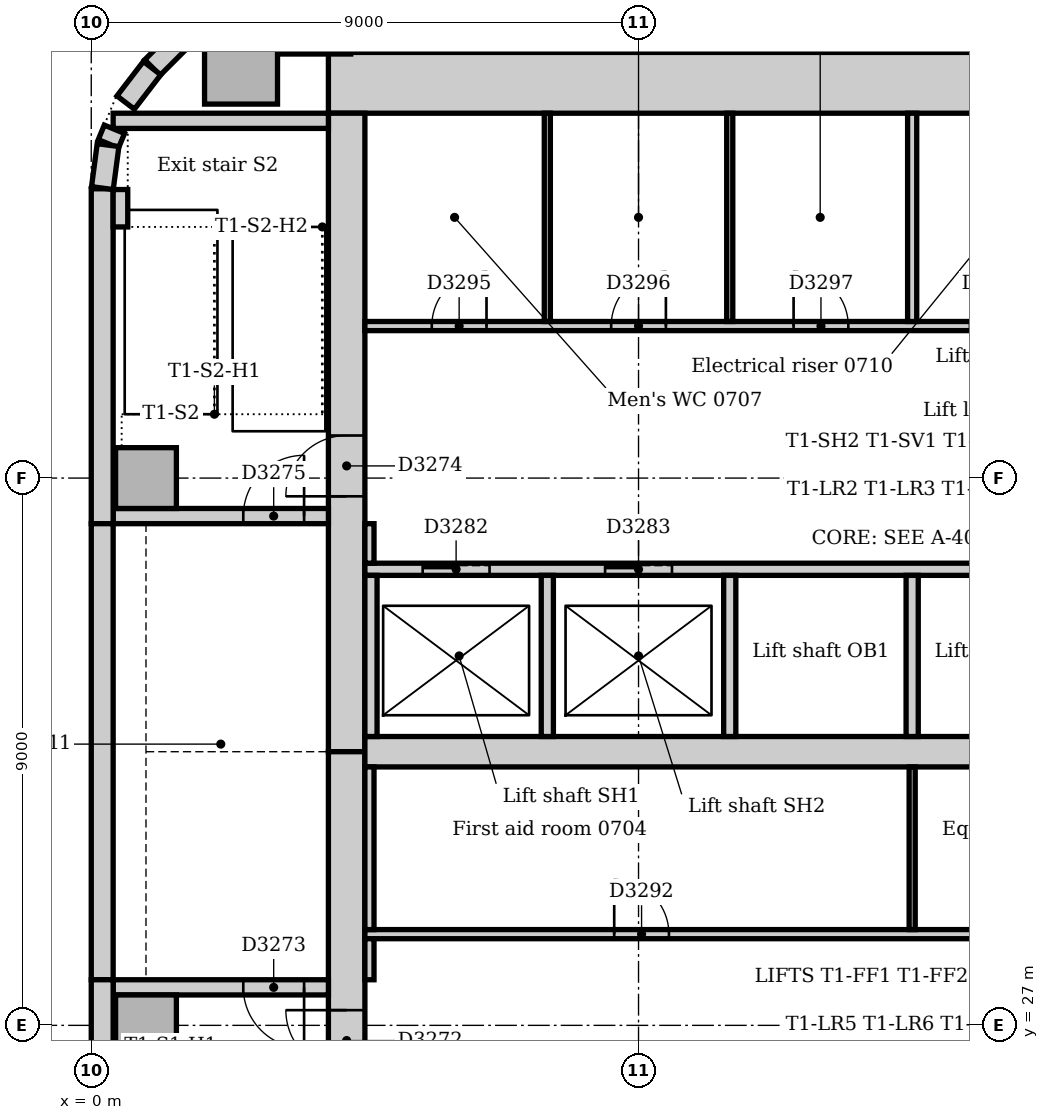
"""IFC4 building model, lengths in metres.
Left out: names, types, materials, properties, quantities, classifications, styles, units other than length and angle.
Written with IfcOpenShell. Run it as: python <this file> out.ifc"""

import sys

from ifc_helpers import new_model, si_unit, direction, frame, frame_2d, origin, origin_2d, place, context, subcontext, project, spatial, rectangle, extrude, element, fill, save


model = new_model("IFC4")
c1 = context("Model", 3, precision=1e-05, world=origin(), true_north=direction((0.0, 1.0)))
c2 = subcontext(c1, "Body", "Model", "MODEL_VIEW")
j1 = project(units=[si_unit("LENGTHUNIT", "METRE"), si_unit("PLANEANGLEUNIT", "RADIAN")], contexts=[c1])
p1 = place(None, origin())
s1 = spatial("IfcSite", under=j1, at=p1, CompositionType="ELEMENT")
p2 = place(p1, origin())
s2 = spatial("IfcBuilding", under=s1, at=p2, CompositionType="ELEMENT")
p3 = place(p2, frame((0.0, 0.0, 34.0)))
s3 = spatial("IfcBuildingStorey", under=s2, at=p3, CompositionType="ELEMENT", Elevation=34.0)
p4 = place(p3, frame((23.5, 42.5, 0.0), z_axis=(0.0, 0.0, 1.0), x_axis=(-1.0, 0.0, 0.0)))
e1 = element("IfcWall", 1, at=p4, inside=s3, PredefinedType="SOLIDWALL", context=c2, shape_type="SweptSolid", body=[
    extrude(rectangle(XDim=19.6, YDim=1.0, at=frame_2d((9.8, 0.0))), origin(), (0.0, 0.0, 1.0), 4.0),
])
p5 = place(p3, frame((4.2, 42.0, 0.0), z_axis=(0.0, 0.0, 1.0), x_axis=(0.0, -1.0, 0.0)))
e2 = element("IfcWall", 2, at=p5, inside=s3, PredefinedType="SOLIDWALL", context=c2, shape_type="SweptSolid", body=[
    extrude(rectangle(XDim=10.5, YDim=0.6, at=frame_2d((5.25, 0.0))), origin(), (0.0, 0.0, 1.0), 4.0),
])
p6 = place(p5, frame((5.3, 0.0, 0.0)))
e3 = element("IfcOpeningElement", 3, at=p6, cuts=e2, PredefinedType="OPENING", context=c2, shape_type="SweptSolid", body=[
    extrude(rectangle(XDim=1.0, YDim=2.1, at=frame_2d((0.5, 1.05))), frame((0.0, 0.31, 0.0), z_axis=(0.0, -1.0, 0.0), x_axis=(1.0, 0.0, 0.0)), (0.0, 0.0, 1.0), 0.62),
])
p7 = place(p3, frame((4.2, 31.5, 0.0), z_axis=(0.0, 0.0, 1.0), x_axis=(0.0, -1.0, 0.0)))
e4 = element("IfcWall", 4, at=p7, inside=s3, PredefinedType="SOLIDWALL", context=c2, shape_type="SweptSolid", body=[
    extrude(rectangle(XDim=10.5, YDim=0.6, at=frame_2d((5.25, 0.0))), origin(), (0.0, 0.0, 1.0), 4.0),
])
p8 = place(p7, frame((4.25, 0.0, 0.0)))
e5 = element("IfcOpeningElement", 5, at=p8, cuts=e4, PredefinedType="OPENING", context=c2, shape_type="SweptSolid", body=[
    extrude(rectangle(XDim=1.0, YDim=2.1, at=frame_2d((0.5, 1.05))), frame((0.0, 0.31, 0.0), z_axis=(0.0, -1.0, 0.0), x_axis=(1.0, 0.0, 0.0)), (0.0, 0.0, 1.0), 0.62),
])
p9 = place(p3, frame((4.5, 31.5, 0.0), z_axis=(0.0, 0.0, 1.0), x_axis=(1.0, 0.0, 0.0)))
e6 = element("IfcWall", 6, at=p9, inside=s3, PredefinedType="SOLIDWALL", context=c2, shape_type="SweptSolid", body=[
    extrude(rectangle(XDim=18.0, YDim=0.5, at=frame_2d((9.0, 0.0))), origin(), (0.0, 0.0, 1.0), 4.0),
])
p10 = place(p3, frame((3.9, 27.625, 0.0), z_axis=(0.0, 0.0, 1.0), x_axis=(-1.0, 0.0, 0.0)))
e7 = element("IfcWall", 7, at=p10, inside=s3, PredefinedType="SOLIDWALL", context=c2, shape_type="SweptSolid", body=[
    extrude(rectangle(XDim=3.54, YDim=0.25, at=frame_2d((1.77, 0.0))), origin(), (0.0, 0.0, 1.0), 4.0),
])
p11 = place(p10, frame((0.4, 0.0, 0.0)))
e8 = element("IfcOpeningElement", 8, at=p11, cuts=e7, PredefinedType="OPENING", context=c2, shape_type="SweptSolid", body=[
    extrude(rectangle(XDim=1.0, YDim=2.1, at=frame_2d((0.5, 1.05))), frame((0.0, 0.135, 0.0), z_axis=(0.0, -1.0, 0.0), x_axis=(1.0, 0.0, 0.0)), (0.0, 0.0, 1.0), 0.27),
])
p12 = place(p3, frame((0.36, 35.375, 0.0), z_axis=(0.0, 0.0, 1.0), x_axis=(1.0, 0.0, 0.0)))
e9 = element("IfcWall", 9, at=p12, inside=s3, PredefinedType="SOLIDWALL", context=c2, shape_type="SweptSolid", body=[
    extrude(rectangle(XDim=3.54, YDim=0.25, at=frame_2d((1.77, 0.0))), origin(), (0.0, 0.0, 1.0), 4.0),
])
p13 = place(p12, frame((2.14, 0.0, 0.0)))
e10 = element("IfcOpeningElement", 10, at=p13, cuts=e9, PredefinedType="OPENING", context=c2, shape_type="SweptSolid", body=[
    extrude(rectangle(XDim=1.0, YDim=2.1, at=frame_2d((0.5, 1.05))), frame((0.0, 0.135, 0.0), z_axis=(0.0, -1.0, 0.0), x_axis=(1.0, 0.0, 0.0)), (0.0, 0.0, 1.0), 0.27),
])
p14 = place(p3, frame((3.9, 41.875, 0.0), z_axis=(0.0, 0.0, 1.0), x_axis=(-1.0, 0.0, 0.0)))
e11 = element("IfcWall", 11, at=p14, inside=s3, PredefinedType="SOLIDWALL", context=c2, shape_type="SweptSolid", body=[
    extrude(rectangle(XDim=3.54, YDim=0.25, at=frame_2d((1.77, 0.0))), origin(), (0.0, 0.0, 1.0), 4.0),
])
for number, where, z_axis, x_axis in (
    (12, (3.667, 43.574, 0.0), (0.0, 0.0, 1.0), (1.0, 0.0, 0.0)),
    (13, (2.463, 42.75, 0.0), (0.0, 0.0, 1.0), (1.0, 0.0, 0.0)),
):
    element("IfcColumn", number, at=place(p3, frame(where, z_axis=z_axis, x_axis=x_axis)), inside=s3, PredefinedType="COLUMN", context=c2, shape_type="SweptSolid", body=[
        extrude(rectangle(XDim=1.2, YDim=1.2, at=origin_2d()), origin(), (0.0, 0.0, 1.0), 3.85),
    ])
for number, where, z_axis, x_axis in (
    (14, (0.9, 27.0, 0.0), (0.0, 0.0, 1.0), (1.0, 0.0, 0.0)),
    (15, (0.9, 36.0, 0.0), (0.0, 0.0, 1.0), (1.0, 0.0, 0.0)),
):
    element("IfcColumn", number, at=place(p3, frame(where, z_axis=z_axis, x_axis=x_axis)), inside=s3, PredefinedType="COLUMN", context=c2, shape_type="SweptSolid", body=[
        extrude(rectangle(XDim=1.0, YDim=1.0, at=origin_2d()), origin(), (0.0, 0.0, 1.0), 4.0),
    ])
p15 = place(p3, frame((2.249, 43.994, 0.0), z_axis=(0.0, 0.0, 1.0), x_axis=(-0.707106781187, -0.707106781187, 0.0)))
e16 = element("IfcWall", 16, at=p15, inside=s3, PredefinedType="STANDARD", context=c2, shape_type="SweptSolid", body=[
    extrude(rectangle(XDim=1.757, YDim=0.36, at=frame_2d((0.879, 0.0))), origin(), (0.0, 0.0, 1.0), 3.85),
])
p16 = place(p3, frame((0.18, 40.757, 0.0), z_axis=(0.0, 0.0, 1.0), x_axis=(0.0, -1.0, 0.0)))
e17 = element("IfcWall", 17, at=p16, inside=s3, PredefinedType="STANDARD", context=c2, shape_type="SweptSolid", body=[
    extrude(rectangle(XDim=5.507, YDim=0.36, at=frame_2d((2.754, 0.0))), origin(), (0.0, 0.0, 1.0), 3.85),
])
p17 = place(p3, frame((0.18, 35.25, 0.0), z_axis=(0.0, 0.0, 1.0), x_axis=(0.0, -1.0, 0.0)))
e18 = element("IfcWall", 18, at=p17, inside=s3, PredefinedType="STANDARD", context=c2, shape_type="SweptSolid", body=[
    extrude(rectangle(XDim=7.5, YDim=0.36, at=frame_2d((3.75, 0.0))), origin(), (0.0, 0.0, 1.0), 3.85),
])
p18 = place(p3, frame((0.18, 27.75, 0.0), z_axis=(0.0, 0.0, 1.0), x_axis=(0.0, -1.0, 0.0)))
e19 = element("IfcWall", 19, at=p18, inside=s3, PredefinedType="STANDARD", context=c2, shape_type="SweptSolid", body=[
    extrude(rectangle(XDim=6.75, YDim=0.36, at=frame_2d((3.375, 0.0))), origin(), (0.0, 0.0, 1.0), 3.85),
])
p19 = place(p3, frame((1.0, 42.741, 0.0), z_axis=(0.0, 0.0, 1.0), x_axis=(-0.608802368033, -0.793321924995, 0.0)))
e20 = element("IfcWall", 20, at=p19, inside=s3, PredefinedType="STANDARD", context=c2, shape_type="SweptSolid", body=[
    extrude(rectangle(XDim=0.713, YDim=0.36, at=frame_2d((0.357, 0.0))), origin(), (0.0, 0.0, 1.0), 3.85),
])
p20 = place(p3, frame((0.381, 41.736, 0.0), z_axis=(0.0, 0.0, 1.0), x_axis=(-0.382773360986, -0.923842277729, 0.0)))
e21 = element("IfcWall", 21, at=p20, inside=s3, PredefinedType="STANDARD", context=c2, shape_type="SweptSolid", body=[
    extrude(rectangle(XDim=0.258, YDim=0.36, at=frame_2d((0.129, 0.0))), origin(), (0.0, 0.0, 1.0), 3.85),
])
p21 = place(p3, frame((0.276, 41.476, 0.0), z_axis=(0.0, 0.0, 1.0), x_axis=(-0.13055608231, -0.99144092581, 0.0)))
e22 = element("IfcWall", 22, at=p21, inside=s3, PredefinedType="STANDARD", context=c2, shape_type="SweptSolid", body=[
    extrude(rectangle(XDim=0.713, YDim=0.36, at=frame_2d((0.356, 0.0))), origin(), (0.0, 0.0, 1.0), 3.85),
])
p22 = place(p3, frame((0.48, 40.13, 0.0), z_axis=(0.0, 0.0, 1.0), x_axis=(0.0, 1.0, 0.0)))
e23 = element("IfcWall", 23, at=p22, inside=s3, PredefinedType="STANDARD", context=c2, shape_type="SweptSolid", body=[
    extrude(rectangle(XDim=0.615, YDim=0.24, at=frame_2d((0.307, 0.0))), origin(), (0.0, 0.0, 1.0), 4.0),
])
p23 = place(p3, frame((4.5, 34.5, 0.0), z_axis=(0.0, 0.0, 1.0), x_axis=(1.0, 0.0, 0.0)))
e24 = element("IfcWall", 24, at=p23, inside=s3, PredefinedType="PARTITIONING", context=c2, shape_type="SweptSolid", body=[
    extrude(rectangle(XDim=18.0, YDim=0.2, at=frame_2d((9.0, 0.0))), origin(), (0.0, 0.0, 1.0), 3.85),
])
p24 = place(p23, frame((0.95, 0.0, 0.0)))
e25 = element("IfcOpeningElement", 25, at=p24, cuts=e24, PredefinedType="OPENING", context=c2, shape_type="SweptSolid", body=[
    extrude(rectangle(XDim=1.1, YDim=2.1, at=frame_2d((0.55, 1.05))), frame((0.0, 0.11, 0.0), z_axis=(0.0, -1.0, 0.0), x_axis=(1.0, 0.0, 0.0)), (0.0, 0.0, 1.0), 0.22),
])
p25 = place(p23, frame((3.95, 0.0, 0.0)))
e26 = element("IfcOpeningElement", 26, at=p25, cuts=e24, PredefinedType="OPENING", context=c2, shape_type="SweptSolid", body=[
    extrude(rectangle(XDim=1.1, YDim=2.1, at=frame_2d((0.55, 1.05))), frame((0.0, 0.11, 0.0), z_axis=(0.0, -1.0, 0.0), x_axis=(1.0, 0.0, 0.0)), (0.0, 0.0, 1.0), 0.22),
])
p26 = place(p23, frame((12.95, 0.0, 0.0)))
e27 = element("IfcOpeningElement", 27, at=p26, cuts=e24, PredefinedType="OPENING", context=c2, shape_type="SweptSolid", body=[
    extrude(rectangle(XDim=1.1, YDim=2.1, at=frame_2d((0.55, 1.05))), frame((0.0, 0.11, 0.0), z_axis=(0.0, -1.0, 0.0), x_axis=(1.0, 0.0, 0.0)), (0.0, 0.0, 1.0), 0.22),
])
p27 = place(p23, frame((15.95, 0.0, 0.0)))
e28 = element("IfcOpeningElement", 28, at=p27, cuts=e24, PredefinedType="OPENING", context=c2, shape_type="SweptSolid", body=[
    extrude(rectangle(XDim=1.1, YDim=2.1, at=frame_2d((0.55, 1.05))), frame((0.0, 0.11, 0.0), z_axis=(0.0, -1.0, 0.0), x_axis=(1.0, 0.0, 0.0)), (0.0, 0.0, 1.0), 0.22),
])
for number, where, z_axis, x_axis in (
    (29, (4.6, 31.75, 0.0), (0.0, 0.0, 1.0), (0.0, 1.0, 0.0)),
    (30, (7.5, 31.75, 0.0), (0.0, 0.0, 1.0), (0.0, 1.0, 0.0)),
    (31, (10.5, 31.75, 0.0), (0.0, 0.0, 1.0), (0.0, 1.0, 0.0)),
    (32, (13.5, 31.75, 0.0), (0.0, 0.0, 1.0), (0.0, 1.0, 0.0)),
):
    element("IfcWall", number, at=place(p3, frame(where, z_axis=z_axis, x_axis=x_axis)), inside=s3, PredefinedType="PARTITIONING", context=c2, shape_type="SweptSolid", body=[
        extrude(rectangle(XDim=2.65, YDim=0.2, at=frame_2d((1.325, 0.0))), origin(), (0.0, 0.0, 1.0), 3.85),
    ])
p28 = place(p3, frame((4.5, 28.5, 0.0), z_axis=(0.0, 0.0, 1.0), x_axis=(1.0, 0.0, 0.0)))
e33 = element("IfcWall", 33, at=p28, inside=s3, PredefinedType="PARTITIONING", context=c2, shape_type="SweptSolid", body=[
    extrude(rectangle(XDim=18.0, YDim=0.15, at=frame_2d((9.0, 0.0))), origin(), (0.0, 0.0, 1.0), 3.85),
])
p29 = place(p28, frame((4.1, 0.0, 0.0)))
e34 = element("IfcOpeningElement", 34, at=p29, cuts=e33, PredefinedType="OPENING", context=c2, shape_type="SweptSolid", body=[
    extrude(rectangle(XDim=0.9, YDim=2.1, at=frame_2d((0.45, 1.05))), frame((0.0, 0.085, 0.0), z_axis=(0.0, -1.0, 0.0), x_axis=(1.0, 0.0, 0.0)), (0.0, 0.0, 1.0), 0.17),
])
p30 = place(p28, frame((10.8, 0.0, 0.0)))
e35 = element("IfcOpeningElement", 35, at=p30, cuts=e33, PredefinedType="OPENING", context=c2, shape_type="SweptSolid", body=[
    extrude(rectangle(XDim=0.9, YDim=2.1, at=frame_2d((0.45, 1.05))), frame((0.0, 0.085, 0.0), z_axis=(0.0, -1.0, 0.0), x_axis=(1.0, 0.0, 0.0)), (0.0, 0.0, 1.0), 0.17),
])
p31 = place(p28, frame((15.2, 0.0, 0.0)))
e36 = element("IfcOpeningElement", 36, at=p31, cuts=e33, PredefinedType="OPENING", context=c2, shape_type="SweptSolid", body=[
    extrude(rectangle(XDim=0.9, YDim=2.1, at=frame_2d((0.45, 1.05))), frame((0.0, 0.085, 0.0), z_axis=(0.0, -1.0, 0.0), x_axis=(1.0, 0.0, 0.0)), (0.0, 0.0, 1.0), 0.17),
])
p32 = place(p3, frame((4.5, 38.5, 0.0), z_axis=(0.0, 0.0, 1.0), x_axis=(1.0, 0.0, 0.0)))
e37 = element("IfcWall", 37, at=p32, inside=s3, PredefinedType="PARTITIONING", context=c2, shape_type="SweptSolid", body=[
    extrude(rectangle(XDim=11.9, YDim=0.15, at=frame_2d((5.95, 0.0))), origin(), (0.0, 0.0, 1.0), 3.85),
])
p33 = place(p32, frame((1.1, 0.0, 0.0)))
e38 = element("IfcOpeningElement", 38, at=p33, cuts=e37, PredefinedType="OPENING", context=c2, shape_type="SweptSolid", body=[
    extrude(rectangle(XDim=0.9, YDim=2.1, at=frame_2d((0.45, 1.05))), frame((0.0, 0.085, 0.0), z_axis=(0.0, -1.0, 0.0), x_axis=(1.0, 0.0, 0.0)), (0.0, 0.0, 1.0), 0.17),
])
p34 = place(p32, frame((4.05, 0.0, 0.0)))
e39 = element("IfcOpeningElement", 39, at=p34, cuts=e37, PredefinedType="OPENING", context=c2, shape_type="SweptSolid", body=[
    extrude(rectangle(XDim=0.9, YDim=2.1, at=frame_2d((0.45, 1.05))), frame((0.0, 0.085, 0.0), z_axis=(0.0, -1.0, 0.0), x_axis=(1.0, 0.0, 0.0)), (0.0, 0.0, 1.0), 0.17),
])
p35 = place(p32, frame((7.05, 0.0, 0.0)))
e40 = element("IfcOpeningElement", 40, at=p35, cuts=e37, PredefinedType="OPENING", context=c2, shape_type="SweptSolid", body=[
    extrude(rectangle(XDim=0.9, YDim=2.1, at=frame_2d((0.45, 1.05))), frame((0.0, 0.085, 0.0), z_axis=(0.0, -1.0, 0.0), x_axis=(1.0, 0.0, 0.0)), (0.0, 0.0, 1.0), 0.17),
])
p36 = place(p32, frame((9.95, 0.0, 0.0)))
e41 = element("IfcOpeningElement", 41, at=p36, cuts=e37, PredefinedType="OPENING", context=c2, shape_type="SweptSolid", body=[
    extrude(rectangle(XDim=0.8, YDim=2.1, at=frame_2d((0.4, 1.05))), frame((0.0, 0.085, 0.0), z_axis=(0.0, -1.0, 0.0), x_axis=(1.0, 0.0, 0.0)), (0.0, 0.0, 1.0), 0.17),
])
p37 = place(p3, frame((4.575, 27.75, 0.0), z_axis=(0.0, 0.0, 1.0), x_axis=(0.0, 1.0, 0.0)))
e42 = element("IfcWall", 42, at=p37, inside=s3, PredefinedType="PARTITIONING", context=c2, shape_type="SweptSolid", body=[
    extrude(rectangle(XDim=0.675, YDim=0.15, at=frame_2d((0.338, 0.0))), origin(), (0.0, 0.0, 1.0), 3.85),
])
p38 = place(p3, frame((4.575, 28.575, 0.0), z_axis=(0.0, 0.0, 1.0), x_axis=(0.0, 1.0, 0.0)))
e43 = element("IfcWall", 43, at=p38, inside=s3, PredefinedType="PARTITIONING", context=c2, shape_type="SweptSolid", body=[
    extrude(rectangle(XDim=2.675, YDim=0.15, at=frame_2d((1.337, 0.0))), origin(), (0.0, 0.0, 1.0), 3.85),
])
p39 = place(p3, frame((4.575, 34.6, 0.0), z_axis=(0.0, 0.0, 1.0), x_axis=(0.0, 1.0, 0.0)))
e44 = element("IfcWall", 44, at=p39, inside=s3, PredefinedType="PARTITIONING", context=c2, shape_type="SweptSolid", body=[
    extrude(rectangle(XDim=0.65, YDim=0.15, at=frame_2d((0.325, 0.0))), origin(), (0.0, 0.0, 1.0), 3.85),
])
p40 = place(p3, frame((13.5, 38.575, 0.0), z_axis=(0.0, 0.0, 1.0), x_axis=(0.0, 1.0, 0.0)))
e45 = element("IfcWall", 45, at=p40, inside=s3, PredefinedType="PARTITIONING", context=c2, shape_type="SweptSolid", body=[
    extrude(rectangle(XDim=3.425, YDim=0.15, at=frame_2d((1.712, 0.0))), origin(), (0.0, 0.0, 1.0), 3.85),
])
for number, where, z_axis, x_axis in (
    (46, (7.5, 38.575, 0.0), (0.0, 0.0, 1.0), (0.0, 1.0, 0.0)),
    (47, (10.5, 38.575, 0.0), (0.0, 0.0, 1.0), (0.0, 1.0, 0.0)),
):
    element("IfcWall", number, at=place(p3, frame(where, z_axis=z_axis, x_axis=x_axis)), inside=s3, PredefinedType="PARTITIONING", context=c2, shape_type="SweptSolid", body=[
        extrude(rectangle(XDim=3.425, YDim=0.1, at=frame_2d((1.712, 0.0))), origin(), (0.0, 0.0, 1.0), 3.85),
    ])
p41 = place(p3, frame((13.5, 28.575, 0.0), z_axis=(0.0, 0.0, 1.0), x_axis=(0.0, 1.0, 0.0)))
e48 = element("IfcWall", 48, at=p41, inside=s3, PredefinedType="PARTITIONING", context=c2, shape_type="SweptSolid", body=[
    extrude(rectangle(XDim=2.675, YDim=0.1, at=frame_2d((1.337, 0.0))), origin(), (0.0, 0.0, 1.0), 3.85),
])
p42 = place(p8, frame((1.0, 0.0, 0.0), z_axis=(0.0, 0.0, 1.0), x_axis=(-1.0, 0.0, 0.0)))
e49 = element("IfcDoor", 49, at=p42, inside=s3, OperationType="SINGLE_SWING_RIGHT", PredefinedType="DOOR", context=c2, shape_type="SweptSolid", body=[
    extrude(rectangle(XDim=1.0, YDim=2.1, at=frame_2d((0.5, 1.05))), frame((0.0, 0.025, 0.0), z_axis=(0.0, -1.0, 0.0), x_axis=(1.0, 0.0, 0.0)), (0.0, 0.0, 1.0), 0.05),
])
fill(e5, e49)
p43 = place(p11, origin())
e50 = element("IfcDoor", 50, at=p43, inside=s3, OperationType="SINGLE_SWING_LEFT", PredefinedType="DOOR", context=c2, shape_type="SweptSolid", body=[
    extrude(rectangle(XDim=1.0, YDim=2.1, at=frame_2d((0.5, 1.05))), frame((0.0, 0.025, 0.0), z_axis=(0.0, -1.0, 0.0), x_axis=(1.0, 0.0, 0.0)), (0.0, 0.0, 1.0), 0.05),
])
fill(e8, e50)
p44 = place(p6, frame((1.0, 0.0, 0.0), z_axis=(0.0, 0.0, 1.0), x_axis=(-1.0, 0.0, 0.0)))
e51 = element("IfcDoor", 51, at=p44, inside=s3, OperationType="SINGLE_SWING_LEFT", PredefinedType="DOOR", context=c2, shape_type="SweptSolid", body=[
    extrude(rectangle(XDim=1.0, YDim=2.1, at=frame_2d((0.5, 1.05))), frame((0.0, 0.025, 0.0), z_axis=(0.0, -1.0, 0.0), x_axis=(1.0, 0.0, 0.0)), (0.0, 0.0, 1.0), 0.05),
])
fill(e3, e51)
p45 = place(p13, origin())
e52 = element("IfcDoor", 52, at=p45, inside=s3, OperationType="SINGLE_SWING_RIGHT", PredefinedType="DOOR", context=c2, shape_type="SweptSolid", body=[
    extrude(rectangle(XDim=1.0, YDim=2.1, at=frame_2d((0.5, 1.05))), frame((0.0, 0.025, 0.0), z_axis=(0.0, -1.0, 0.0), x_axis=(1.0, 0.0, 0.0)), (0.0, 0.0, 1.0), 0.05),
])
fill(e10, e52)
p46 = place(p24, origin())
e53 = element("IfcDoor", 53, at=p46, inside=s3, OperationType="SLIDING_TO_LEFT", PredefinedType="DOOR", context=c2, shape_type="SweptSolid", body=[
    extrude(rectangle(XDim=1.1, YDim=2.1, at=frame_2d((0.55, 1.05))), frame((0.0, 0.025, 0.0), z_axis=(0.0, -1.0, 0.0), x_axis=(1.0, 0.0, 0.0)), (0.0, 0.0, 1.0), 0.05),
])
fill(e25, e53)
p47 = place(p25, origin())
e54 = element("IfcDoor", 54, at=p47, inside=s3, OperationType="SLIDING_TO_LEFT", PredefinedType="DOOR", context=c2, shape_type="SweptSolid", body=[
    extrude(rectangle(XDim=1.1, YDim=2.1, at=frame_2d((0.55, 1.05))), frame((0.0, 0.025, 0.0), z_axis=(0.0, -1.0, 0.0), x_axis=(1.0, 0.0, 0.0)), (0.0, 0.0, 1.0), 0.05),
])
fill(e26, e54)
p48 = place(p29, origin())
e55 = element("IfcDoor", 55, at=p48, inside=s3, OperationType="SINGLE_SWING_LEFT", PredefinedType="DOOR", context=c2, shape_type="SweptSolid", body=[
    extrude(rectangle(XDim=0.9, YDim=2.1, at=frame_2d((0.45, 1.05))), frame((0.0, 0.025, 0.0), z_axis=(0.0, -1.0, 0.0), x_axis=(1.0, 0.0, 0.0)), (0.0, 0.0, 1.0), 0.05),
])
fill(e34, e55)
p49 = place(p33, origin())
e56 = element("IfcDoor", 56, at=p49, inside=s3, OperationType="SINGLE_SWING_RIGHT", PredefinedType="DOOR", context=c2, shape_type="SweptSolid", body=[
    extrude(rectangle(XDim=0.9, YDim=2.1, at=frame_2d((0.45, 1.05))), frame((0.0, 0.025, 0.0), z_axis=(0.0, -1.0, 0.0), x_axis=(1.0, 0.0, 0.0)), (0.0, 0.0, 1.0), 0.05),
])
fill(e38, e56)
p50 = place(p34, origin())
e57 = element("IfcDoor", 57, at=p50, inside=s3, OperationType="SINGLE_SWING_RIGHT", PredefinedType="DOOR", context=c2, shape_type="SweptSolid", body=[
    extrude(rectangle(XDim=0.9, YDim=2.1, at=frame_2d((0.45, 1.05))), frame((0.0, 0.025, 0.0), z_axis=(0.0, -1.0, 0.0), x_axis=(1.0, 0.0, 0.0)), (0.0, 0.0, 1.0), 0.05),
])
fill(e39, e57)
p51 = place(p35, origin())
e58 = element("IfcDoor", 58, at=p51, inside=s3, OperationType="SINGLE_SWING_LEFT", PredefinedType="DOOR", context=c2, shape_type="SweptSolid", body=[
    extrude(rectangle(XDim=0.9, YDim=2.1, at=frame_2d((0.45, 1.05))), frame((0.0, 0.025, 0.0), z_axis=(0.0, -1.0, 0.0), x_axis=(1.0, 0.0, 0.0)), (0.0, 0.0, 1.0), 0.05),
])
fill(e40, e58)
save(model, sys.argv[1])
